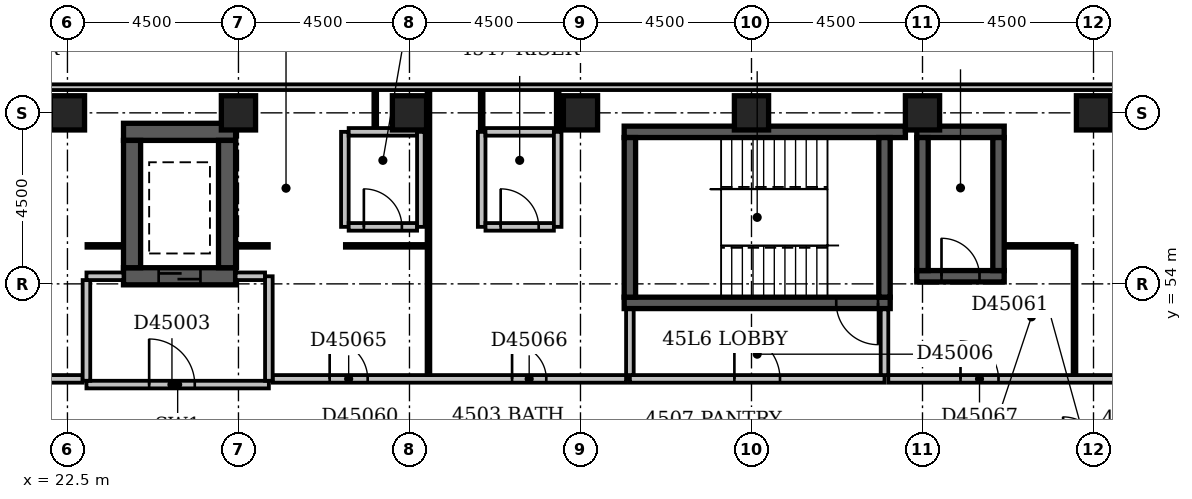
"""IFC4 building model, lengths in metres.
Left out: names, types, materials, properties, quantities, classifications, styles, units other than length and angle.
Written with IfcOpenShell. Run it as: python <this file> out.ifc"""

import sys

from ifc_helpers import new_model, si_unit, direction, frame, frame_2d, origin, origin_2d, place, context, subcontext, project, spatial, rectangle, extrude, element, fill, save


model = new_model("IFC4")
c1 = context("Model", 3, precision=1e-05, world=origin(), true_north=direction((0.0, 1.0)))
c2 = subcontext(c1, "Body", "Model", "MODEL_VIEW")
j1 = project(units=[si_unit("LENGTHUNIT", "METRE"), si_unit("PLANEANGLEUNIT", "RADIAN")], contexts=[c1])
p1 = place(None, origin())
s1 = spatial("IfcSite", under=j1, at=p1, CompositionType="ELEMENT")
p2 = place(p1, origin())
s2 = spatial("IfcBuilding", under=s1, at=p2, CompositionType="ELEMENT")
p3 = place(p2, frame((0.0, 0.0, 179.0)))
s3 = spatial("IfcBuildingStorey", under=s2, at=p3, CompositionType="ELEMENT", Elevation=179.0)
p4 = place(p3, frame((23.975, 54.2, -0.3), z_axis=(0.0, 0.0, 1.0), x_axis=(1.0, 0.0, 0.0)))
e1 = element("IfcWall", 1, at=p4, inside=s3, PredefinedType="SHEAR", context=c2, shape_type="SweptSolid", body=[
    extrude(rectangle(XDim=2.95, YDim=0.45, at=frame_2d((1.475, 0.0))), origin(), (0.0, 0.0, 1.0), 3.6),
])
p5 = place(p4, frame((0.925, 0.0, 0.3)))
e2 = element("IfcOpeningElement", 2, at=p5, cuts=e1, PredefinedType="OPENING", context=c2, shape_type="SweptSolid", body=[
    extrude(rectangle(XDim=1.1, YDim=2.1, at=frame_2d((0.55, 1.05))), frame((0.0, 0.237, 0.0), z_axis=(0.0, -1.0, 0.0), x_axis=(1.0, 0.0, 0.0)), (0.0, 0.0, 1.0), 0.474),
])
p6 = place(p3, frame((23.975, 58.0, -0.3), z_axis=(0.0, 0.0, 1.0), x_axis=(1.0, 0.0, 0.0)))
e3 = element("IfcWall", 3, at=p6, inside=s3, PredefinedType="SHEAR", context=c2, shape_type="SweptSolid", body=[
    extrude(rectangle(XDim=2.95, YDim=0.45, at=frame_2d((1.475, 0.0))), origin(), (0.0, 0.0, 1.0), 3.6),
])
for number, where, z_axis, x_axis in (
    (4, (24.2, 54.425, -0.3), (0.0, 0.0, 1.0), (0.0, 1.0, 0.0)),
    (5, (26.7, 54.425, -0.3), (0.0, 0.0, 1.0), (0.0, 1.0, 0.0)),
):
    element("IfcWall", number, at=place(p3, frame(where, z_axis=z_axis, x_axis=x_axis)), inside=s3, PredefinedType="SHEAR", context=c2, shape_type="SweptSolid", body=[
        extrude(rectangle(XDim=3.35, YDim=0.45, at=frame_2d((1.675, 0.0))), origin(), (0.0, 0.0, 1.0), 3.6),
    ])
p7 = place(p3, frame((37.15, 53.5, -0.3), z_axis=(0.0, 0.0, 1.0), x_axis=(1.0, 0.0, 0.0)))
e6 = element("IfcWall", 6, at=p7, inside=s3, PredefinedType="SHEAR", context=c2, shape_type="SweptSolid", body=[
    extrude(rectangle(XDim=7.0, YDim=0.3, at=frame_2d((3.5, 0.0))), origin(), (0.0, 0.0, 1.0), 3.6),
])
p8 = place(p7, frame((5.58, 0.0, 0.3)))
e7 = element("IfcOpeningElement", 7, at=p8, cuts=e6, PredefinedType="OPENING", context=c2, shape_type="SweptSolid", body=[
    extrude(rectangle(XDim=1.1, YDim=2.1, at=frame_2d((0.55, 1.05))), frame((0.0, 0.162, 0.0), z_axis=(0.0, -1.0, 0.0), x_axis=(1.0, 0.0, 0.0)), (0.0, 0.0, 1.0), 0.324),
])
p9 = place(p3, frame((37.15, 58.0, -0.3), z_axis=(0.0, 0.0, 1.0), x_axis=(1.0, 0.0, 0.0)))
e8 = element("IfcWall", 8, at=p9, inside=s3, PredefinedType="SHEAR", context=c2, shape_type="SweptSolid", body=[
    extrude(rectangle(XDim=7.4, YDim=0.3, at=frame_2d((3.7, 0.0))), origin(), (0.0, 0.0, 1.0), 3.6),
])
for number, where, z_axis, x_axis in (
    (9, (37.3, 53.65, -0.3), (0.0, 0.0, 1.0), (0.0, 1.0, 0.0)),
    (10, (44.0, 53.65, -0.3), (0.0, 0.0, 1.0), (0.0, 1.0, 0.0)),
):
    element("IfcWall", number, at=place(p3, frame(where, z_axis=z_axis, x_axis=x_axis)), inside=s3, PredefinedType="SHEAR", context=c2, shape_type="SweptSolid", body=[
        extrude(rectangle(XDim=4.2, YDim=0.3, at=frame_2d((2.1, 0.0))), origin(), (0.0, 0.0, 1.0), 3.6),
    ])
p10 = place(p3, frame((44.85, 54.2, -0.3), z_axis=(0.0, 0.0, 1.0), x_axis=(1.0, 0.0, 0.0)))
e11 = element("IfcWall", 11, at=p10, inside=s3, PredefinedType="SHEAR", context=c2, shape_type="SweptSolid", body=[
    extrude(rectangle(XDim=2.3, YDim=0.3, at=frame_2d((1.15, 0.0))), origin(), (0.0, 0.0, 1.0), 3.6),
])
p11 = place(p10, frame((0.65, 0.0, 0.3)))
e12 = element("IfcOpeningElement", 12, at=p11, cuts=e11, PredefinedType="OPENING", context=c2, shape_type="SweptSolid", body=[
    extrude(rectangle(XDim=1.0, YDim=2.1, at=frame_2d((0.5, 1.05))), frame((0.0, 0.162, 0.0), z_axis=(0.0, -1.0, 0.0), x_axis=(1.0, 0.0, 0.0)), (0.0, 0.0, 1.0), 0.324),
])
p12 = place(p3, frame((44.85, 58.0, -0.3), z_axis=(0.0, 0.0, 1.0), x_axis=(1.0, 0.0, 0.0)))
e13 = element("IfcWall", 13, at=p12, inside=s3, PredefinedType="SHEAR", context=c2, shape_type="SweptSolid", body=[
    extrude(rectangle(XDim=2.3, YDim=0.3, at=frame_2d((1.15, 0.0))), origin(), (0.0, 0.0, 1.0), 3.6),
])
for number, where, z_axis, x_axis in (
    (14, (45.0, 54.35, -0.3), (0.0, 0.0, 1.0), (0.0, 1.0, 0.0)),
    (15, (47.0, 54.35, -0.3), (0.0, 0.0, 1.0), (0.0, 1.0, 0.0)),
):
    element("IfcWall", number, at=place(p3, frame(where, z_axis=z_axis, x_axis=x_axis)), inside=s3, PredefinedType="SHEAR", context=c2, shape_type="SweptSolid", body=[
        extrude(rectangle(XDim=3.5, YDim=0.3, at=frame_2d((1.75, 0.0))), origin(), (0.0, 0.0, 1.0), 3.6),
    ])
for number, where, z_axis, x_axis in (
    (16, (22.5, 58.5, -0.3), (0.0, 0.0, 1.0), (1.0, 0.0, 0.0)),
    (17, (27.0, 58.5, -0.3), (0.0, 0.0, 1.0), (1.0, 0.0, 0.0)),
    (18, (31.5, 58.5, -0.3), (0.0, 0.0, 1.0), (1.0, 0.0, 0.0)),
    (19, (36.0, 58.5, -0.3), (0.0, 0.0, 1.0), (1.0, 0.0, 0.0)),
    (20, (40.5, 58.5, -0.3), (0.0, 0.0, 1.0), (1.0, 0.0, 0.0)),
    (21, (45.0, 58.5, -0.3), (0.0, 0.0, 1.0), (1.0, 0.0, 0.0)),
    (22, (49.5, 58.5, -0.3), (0.0, 0.0, 1.0), (1.0, 0.0, 0.0)),
):
    element("IfcColumn", number, at=place(p3, frame(where, z_axis=z_axis, x_axis=x_axis)), inside=s3, PredefinedType="COLUMN", context=c2, shape_type="SweptSolid", body=[
        extrude(rectangle(XDim=0.9, YDim=0.9, at=origin_2d()), origin(), (0.0, 0.0, 1.0), 3.6),
    ])
p13 = place(p3, frame((68.1, 59.175, 0.0), z_axis=(0.0, 0.0, 1.0), x_axis=(-1.0, 0.0, 0.0)))
e23 = element("IfcWall", 23, at=p13, inside=s3, PredefinedType="STANDARD", context=c2, shape_type="SweptSolid", body=[
    extrude(rectangle(XDim=68.85, YDim=0.15, at=frame_2d((34.425, 0.0))), origin(), (0.0, 0.0, 1.0), 2.7),
])
p14 = place(p3, frame((23.0, 51.35, 0.0), z_axis=(0.0, 0.0, 1.0), x_axis=(1.0, 0.0, 0.0)))
e24 = element("IfcWall", 24, at=p14, inside=s3, PredefinedType="PARTITIONING", context=c2, shape_type="SweptSolid", body=[
    extrude(rectangle(XDim=4.8, YDim=0.2, at=frame_2d((2.4, 0.0))), origin(), (0.0, 0.0, 1.0), 3.3),
])
p15 = place(p14, frame((1.65, 0.0, 0.0)))
e25 = element("IfcOpeningElement", 25, at=p15, cuts=e24, PredefinedType="OPENING", context=c2, shape_type="SweptSolid", body=[
    extrude(rectangle(XDim=1.2, YDim=2.1, at=frame_2d((0.6, 1.05))), frame((0.0, 0.112, 0.0), z_axis=(0.0, -1.0, 0.0), x_axis=(1.0, 0.0, 0.0)), (0.0, 0.0, 1.0), 0.224),
])
p16 = place(p3, frame((27.8, 51.45, 0.0), z_axis=(0.0, 0.0, 1.0), x_axis=(0.0, 1.0, 0.0)))
e26 = element("IfcWall", 26, at=p16, inside=s3, PredefinedType="PARTITIONING", context=c2, shape_type="SweptSolid", body=[
    extrude(rectangle(XDim=2.75, YDim=0.2, at=frame_2d((1.375, 0.0))), origin(), (0.0, 0.0, 1.0), 3.3),
])
p17 = place(p3, frame((23.0, 54.2, 0.0), z_axis=(0.0, 0.0, 1.0), x_axis=(1.0, 0.0, 0.0)))
e27 = element("IfcWall", 27, at=p17, inside=s3, PredefinedType="PARTITIONING", context=c2, shape_type="SweptSolid", body=[
    extrude(rectangle(XDim=0.975, YDim=0.2, at=frame_2d((0.488, 0.0))), origin(), (0.0, 0.0, 1.0), 3.3),
])
p18 = place(p3, frame((26.925, 54.2, 0.0), z_axis=(0.0, 0.0, 1.0), x_axis=(1.0, 0.0, 0.0)))
e28 = element("IfcWall", 28, at=p18, inside=s3, PredefinedType="PARTITIONING", context=c2, shape_type="SweptSolid", body=[
    extrude(rectangle(XDim=0.775, YDim=0.2, at=frame_2d((0.387, 0.0))), origin(), (0.0, 0.0, 1.0), 3.3),
])
p19 = place(p3, frame((23.0, 51.45, 0.0), z_axis=(0.0, 0.0, 1.0), x_axis=(0.0, 1.0, 0.0)))
e29 = element("IfcWall", 29, at=p19, inside=s3, PredefinedType="PARTITIONING", context=c2, shape_type="SweptSolid", body=[
    extrude(rectangle(XDim=2.65, YDim=0.2, at=frame_2d((1.325, 0.0))), origin(), (0.0, 0.0, 1.0), 3.3),
])
p20 = place(p3, frame((37.3, 51.5, 0.0), z_axis=(0.0, 0.0, 1.0), x_axis=(1.0, 0.0, 0.0)))
e30 = element("IfcWall", 30, at=p20, inside=s3, PredefinedType="PARTITIONING", context=c2, shape_type="SweptSolid", body=[
    extrude(rectangle(XDim=6.7, YDim=0.2, at=frame_2d((3.35, 0.0))), origin(), (0.0, 0.0, 1.0), 3.3),
])
p21 = place(p20, frame((2.75, 0.0, 0.0)))
e31 = element("IfcOpeningElement", 31, at=p21, cuts=e30, PredefinedType="OPENING", context=c2, shape_type="SweptSolid", body=[
    extrude(rectangle(XDim=1.2, YDim=2.1, at=frame_2d((0.6, 1.05))), frame((0.0, 0.112, 0.0), z_axis=(0.0, -1.0, 0.0), x_axis=(1.0, 0.0, 0.0)), (0.0, 0.0, 1.0), 0.224),
])
for number, where, z_axis, x_axis in (
    (32, (44.0, 51.6, 0.0), (0.0, 0.0, 1.0), (0.0, 1.0, 0.0)),
    (33, (37.3, 51.6, 0.0), (0.0, 0.0, 1.0), (0.0, 1.0, 0.0)),
):
    element("IfcWall", number, at=place(p3, frame(where, z_axis=z_axis, x_axis=x_axis)), inside=s3, PredefinedType="PARTITIONING", context=c2, shape_type="SweptSolid", body=[
        extrude(rectangle(XDim=1.73, YDim=0.2, at=frame_2d((0.865, 0.0))), origin(), (0.0, 0.0, 1.0), 3.3),
    ])
p22 = place(p3, frame((7.6, 51.5, 0.0), z_axis=(0.0, 0.0, 1.0), x_axis=(1.0, 0.0, 0.0)))
e34 = element("IfcWall", 34, at=p22, inside=s3, PredefinedType="PARTITIONING", context=c2, shape_type="SweptSolid", body=[
    extrude(rectangle(XDim=15.3, YDim=0.2, at=frame_2d((7.65, 0.0))), origin(), (0.0, 0.0, 1.0), 3.3),
])
p23 = place(p22, frame((3.55, 0.0, 0.0)))
e35 = element("IfcOpeningElement", 35, at=p23, cuts=e34, PredefinedType="OPENING", context=c2, shape_type="SweptSolid", body=[
    extrude(rectangle(XDim=0.9, YDim=2.1, at=frame_2d((0.45, 1.05))), frame((0.0, 0.112, 0.0), z_axis=(0.0, -1.0, 0.0), x_axis=(1.0, 0.0, 0.0)), (0.0, 0.0, 1.0), 0.224),
])
p24 = place(p22, frame((11.3, 0.0, 0.0)))
e36 = element("IfcOpeningElement", 36, at=p24, cuts=e34, PredefinedType="OPENING", context=c2, shape_type="SweptSolid", body=[
    extrude(rectangle(XDim=0.9, YDim=2.1, at=frame_2d((0.45, 1.05))), frame((0.0, 0.112, 0.0), z_axis=(0.0, -1.0, 0.0), x_axis=(1.0, 0.0, 0.0)), (0.0, 0.0, 1.0), 0.224),
])
p25 = place(p3, frame((27.9, 51.5, 0.0), z_axis=(0.0, 0.0, 1.0), x_axis=(1.0, 0.0, 0.0)))
e37 = element("IfcWall", 37, at=p25, inside=s3, PredefinedType="PARTITIONING", context=c2, shape_type="SweptSolid", body=[
    extrude(rectangle(XDim=9.3, YDim=0.2, at=frame_2d((4.65, 0.0))), origin(), (0.0, 0.0, 1.0), 3.3),
])
p26 = place(p25, frame((1.5, 0.0, 0.0)))
e38 = element("IfcOpeningElement", 38, at=p26, cuts=e37, PredefinedType="OPENING", context=c2, shape_type="SweptSolid", body=[
    extrude(rectangle(XDim=1.0, YDim=2.1, at=frame_2d((0.5, 1.05))), frame((0.0, 0.112, 0.0), z_axis=(0.0, -1.0, 0.0), x_axis=(1.0, 0.0, 0.0)), (0.0, 0.0, 1.0), 0.224),
])
p27 = place(p25, frame((6.3, 0.0, 0.0)))
e39 = element("IfcOpeningElement", 39, at=p27, cuts=e37, PredefinedType="OPENING", context=c2, shape_type="SweptSolid", body=[
    extrude(rectangle(XDim=0.9, YDim=2.1, at=frame_2d((0.45, 1.05))), frame((0.0, 0.112, 0.0), z_axis=(0.0, -1.0, 0.0), x_axis=(1.0, 0.0, 0.0)), (0.0, 0.0, 1.0), 0.224),
])
p28 = place(p3, frame((44.1, 51.5, 0.0), z_axis=(0.0, 0.0, 1.0), x_axis=(1.0, 0.0, 0.0)))
e40 = element("IfcWall", 40, at=p28, inside=s3, PredefinedType="PARTITIONING", context=c2, shape_type="SweptSolid", body=[
    extrude(rectangle(XDim=9.8, YDim=0.2, at=frame_2d((4.9, 0.0))), origin(), (0.0, 0.0, 1.0), 3.3),
])
p29 = place(p28, frame((1.9, 0.0, 0.0)))
e41 = element("IfcOpeningElement", 41, at=p29, cuts=e40, PredefinedType="OPENING", context=c2, shape_type="SweptSolid", body=[
    extrude(rectangle(XDim=1.0, YDim=2.1, at=frame_2d((0.5, 1.05))), frame((0.0, 0.112, 0.0), z_axis=(0.0, -1.0, 0.0), x_axis=(1.0, 0.0, 0.0)), (0.0, 0.0, 1.0), 0.224),
])
p30 = place(p28, frame((6.9, 0.0, 0.0)))
e42 = element("IfcOpeningElement", 42, at=p30, cuts=e40, PredefinedType="OPENING", context=c2, shape_type="SweptSolid", body=[
    extrude(rectangle(XDim=1.0, YDim=2.1, at=frame_2d((0.5, 1.05))), frame((0.0, 0.112, 0.0), z_axis=(0.0, -1.0, 0.0), x_axis=(1.0, 0.0, 0.0)), (0.0, 0.0, 1.0), 0.224),
])
p31 = place(p3, frame((32.0, 51.6, 0.0), z_axis=(0.0, 0.0, 1.0), x_axis=(0.0, 1.0, 0.0)))
e43 = element("IfcWall", 43, at=p31, inside=s3, PredefinedType="PARTITIONING", context=c2, shape_type="SweptSolid", body=[
    extrude(rectangle(XDim=7.5, YDim=0.1, at=frame_2d((3.75, 0.0))), origin(), (0.0, 0.0, 1.0), 3.3),
])
p32 = place(p3, frame((49.0, 51.6, 0.0), z_axis=(0.0, 0.0, 1.0), x_axis=(0.0, 1.0, 0.0)))
e44 = element("IfcWall", 44, at=p32, inside=s3, PredefinedType="PARTITIONING", context=c2, shape_type="SweptSolid", body=[
    extrude(rectangle(XDim=3.4, YDim=0.1, at=frame_2d((1.7, 0.0))), origin(), (0.0, 0.0, 1.0), 3.3),
])
p33 = place(p3, frame((23.0, 55.0, 0.0), z_axis=(0.0, 0.0, 1.0), x_axis=(1.0, 0.0, 0.0)))
e45 = element("IfcWall", 45, at=p33, inside=s3, PredefinedType="PARTITIONING", context=c2, shape_type="SweptSolid", body=[
    extrude(rectangle(XDim=0.975, YDim=0.1, at=frame_2d((0.488, 0.0))), origin(), (0.0, 0.0, 1.0), 3.3),
])
p34 = place(p3, frame((26.925, 55.0, 0.0), z_axis=(0.0, 0.0, 1.0), x_axis=(1.0, 0.0, 0.0)))
e46 = element("IfcWall", 46, at=p34, inside=s3, PredefinedType="PARTITIONING", context=c2, shape_type="SweptSolid", body=[
    extrude(rectangle(XDim=0.875, YDim=0.1, at=frame_2d((0.438, 0.0))), origin(), (0.0, 0.0, 1.0), 3.3),
])
p35 = place(p3, frame((29.8, 55.0, 0.0), z_axis=(0.0, 0.0, 1.0), x_axis=(1.0, 0.0, 0.0)))
e47 = element("IfcWall", 47, at=p35, inside=s3, PredefinedType="PARTITIONING", context=c2, shape_type="SweptSolid", body=[
    extrude(rectangle(XDim=2.15, YDim=0.1, at=frame_2d((1.075, 0.0))), origin(), (0.0, 0.0, 1.0), 3.3),
])
p36 = place(p3, frame((47.15, 55.0, 0.0), z_axis=(0.0, 0.0, 1.0), x_axis=(1.0, 0.0, 0.0)))
e48 = element("IfcWall", 48, at=p36, inside=s3, PredefinedType="PARTITIONING", context=c2, shape_type="SweptSolid", body=[
    extrude(rectangle(XDim=1.8, YDim=0.1, at=frame_2d((0.9, 0.0))), origin(), (0.0, 0.0, 1.0), 3.3),
])
p37 = place(p3, frame((29.8, 55.5, 0.0), z_axis=(0.0, 0.0, 1.0), x_axis=(0.0, 1.0, 0.0)))
e49 = element("IfcWall", 49, at=p37, inside=s3, PredefinedType="PARTITIONING", context=c2, shape_type="SweptSolid", body=[
    extrude(rectangle(XDim=2.5, YDim=0.2, at=frame_2d((1.25, 0.0))), origin(), (0.0, 0.0, 1.0), 3.3),
])
p38 = place(p3, frame((29.9, 55.5, 0.0), z_axis=(0.0, 0.0, 1.0), x_axis=(1.0, 0.0, 0.0)))
e50 = element("IfcWall", 50, at=p38, inside=s3, PredefinedType="PARTITIONING", context=c2, shape_type="SweptSolid", body=[
    extrude(rectangle(XDim=1.8, YDim=0.2, at=frame_2d((0.9, 0.0))), origin(), (0.0, 0.0, 1.0), 3.3),
])
p39 = place(p38, frame((0.4, 0.0, 0.0)))
e51 = element("IfcOpeningElement", 51, at=p39, cuts=e50, PredefinedType="OPENING", context=c2, shape_type="SweptSolid", body=[
    extrude(rectangle(XDim=1.0, YDim=2.1, at=frame_2d((0.5, 1.05))), frame((0.0, 0.112, 0.0), z_axis=(0.0, -1.0, 0.0), x_axis=(1.0, 0.0, 0.0)), (0.0, 0.0, 1.0), 0.224),
])
for number, where, z_axis, x_axis in (
    (52, (31.8, 55.5, 0.0), (0.0, 0.0, 1.0), (0.0, 1.0, 0.0)),
    (53, (33.4, 55.5, 0.0), (0.0, 0.0, 1.0), (0.0, 1.0, 0.0)),
):
    element("IfcWall", number, at=place(p3, frame(where, z_axis=z_axis, x_axis=x_axis)), inside=s3, PredefinedType="PARTITIONING", context=c2, shape_type="SweptSolid", body=[
        extrude(rectangle(XDim=2.5, YDim=0.2, at=frame_2d((1.25, 0.0))), origin(), (0.0, 0.0, 1.0), 3.3),
    ])
p40 = place(p3, frame((33.5, 55.5, 0.0), z_axis=(0.0, 0.0, 1.0), x_axis=(1.0, 0.0, 0.0)))
e54 = element("IfcWall", 54, at=p40, inside=s3, PredefinedType="PARTITIONING", context=c2, shape_type="SweptSolid", body=[
    extrude(rectangle(XDim=1.8, YDim=0.2, at=frame_2d((0.9, 0.0))), origin(), (0.0, 0.0, 1.0), 3.3),
])
p41 = place(p40, frame((0.4, 0.0, 0.0)))
e55 = element("IfcOpeningElement", 55, at=p41, cuts=e54, PredefinedType="OPENING", context=c2, shape_type="SweptSolid", body=[
    extrude(rectangle(XDim=1.0, YDim=2.1, at=frame_2d((0.5, 1.05))), frame((0.0, 0.112, 0.0), z_axis=(0.0, -1.0, 0.0), x_axis=(1.0, 0.0, 0.0)), (0.0, 0.0, 1.0), 0.224),
])
p42 = place(p3, frame((35.4, 55.5, 0.0), z_axis=(0.0, 0.0, 1.0), x_axis=(0.0, 1.0, 0.0)))
e56 = element("IfcWall", 56, at=p42, inside=s3, PredefinedType="PARTITIONING", context=c2, shape_type="SweptSolid", body=[
    extrude(rectangle(XDim=2.5, YDim=0.2, at=frame_2d((1.25, 0.0))), origin(), (0.0, 0.0, 1.0), 2.4),
])
p43 = place(p3, frame((29.9, 58.0, 0.0), z_axis=(0.0, 0.0, 1.0), x_axis=(1.0, 0.0, 0.0)))
e57 = element("IfcWall", 57, at=p43, inside=s3, PredefinedType="PARTITIONING", context=c2, shape_type="SweptSolid", body=[
    extrude(rectangle(XDim=1.8, YDim=0.2, at=frame_2d((0.9, 0.0))), origin(), (0.0, 0.0, 1.0), 3.3),
])
p44 = place(p3, frame((33.4, 58.0, 0.0), z_axis=(0.0, 0.0, 1.0), x_axis=(0.0, 1.0, 0.0)))
e58 = element("IfcWall", 58, at=p44, inside=s3, PredefinedType="PARTITIONING", context=c2, shape_type="SweptSolid", body=[
    extrude(rectangle(XDim=1.1, YDim=0.1, at=frame_2d((0.55, 0.0))), origin(), (0.0, 0.0, 1.0), 3.3),
])
p45 = place(p3, frame((33.5, 58.0, 0.0), z_axis=(0.0, 0.0, 1.0), x_axis=(1.0, 0.0, 0.0)))
e59 = element("IfcWall", 59, at=p45, inside=s3, PredefinedType="PARTITIONING", context=c2, shape_type="SweptSolid", body=[
    extrude(rectangle(XDim=1.8, YDim=0.2, at=frame_2d((0.9, 0.0))), origin(), (0.0, 0.0, 1.0), 3.3),
])
p46 = place(p3, frame((35.4, 58.0, 0.0), z_axis=(0.0, 0.0, 1.0), x_axis=(0.0, 1.0, 0.0)))
e60 = element("IfcWall", 60, at=p46, inside=s3, PredefinedType="PARTITIONING", context=c2, shape_type="SweptSolid", body=[
    extrude(rectangle(XDim=1.1, YDim=0.1, at=frame_2d((0.55, 0.0))), origin(), (0.0, 0.0, 1.0), 2.4),
])
p47 = place(p3, frame((30.6, 58.1, 0.0), z_axis=(0.0, 0.0, 1.0), x_axis=(0.0, 1.0, 0.0)))
e61 = element("IfcWall", 61, at=p47, inside=s3, PredefinedType="PARTITIONING", context=c2, shape_type="SweptSolid", body=[
    extrude(rectangle(XDim=1.0, YDim=0.1, at=frame_2d((0.5, 0.0))), origin(), (0.0, 0.0, 1.0), 3.3),
])
p48 = place(p15, origin())
e62 = element("IfcDoor", 62, at=p48, inside=s3, OperationType="SINGLE_SWING_LEFT", PredefinedType="DOOR", context=c2, shape_type="SweptSolid", body=[
    extrude(rectangle(XDim=1.2, YDim=2.1, at=frame_2d((0.6, 1.05))), frame((0.0, 0.025, 0.0), z_axis=(0.0, -1.0, 0.0), x_axis=(1.0, 0.0, 0.0)), (0.0, 0.0, 1.0), 0.05),
])
fill(e25, e62)
p49 = place(p5, origin())
e63 = element("IfcDoor", 63, at=p49, inside=s3, OperationType="SLIDING_TO_LEFT", PredefinedType="DOOR", context=c2, shape_type="SweptSolid", body=[
    extrude(rectangle(XDim=1.1, YDim=2.1, at=frame_2d((0.55, 1.05))), frame((0.0, 0.025, 0.0), z_axis=(0.0, -1.0, 0.0), x_axis=(1.0, 0.0, 0.0)), (0.0, 0.0, 1.0), 0.05),
])
fill(e2, e63)
p50 = place(p21, origin())
e64 = element("IfcDoor", 64, at=p50, inside=s3, OperationType="SINGLE_SWING_LEFT", PredefinedType="DOOR", context=c2, shape_type="SweptSolid", body=[
    extrude(rectangle(XDim=1.2, YDim=2.1, at=frame_2d((0.6, 1.05))), frame((0.0, 0.025, 0.0), z_axis=(0.0, -1.0, 0.0), x_axis=(1.0, 0.0, 0.0)), (0.0, 0.0, 1.0), 0.05),
])
fill(e31, e64)
p51 = place(p11, origin())
e65 = element("IfcDoor", 65, at=p51, inside=s3, OperationType="SINGLE_SWING_LEFT", PredefinedType="DOOR", context=c2, shape_type="SweptSolid", body=[
    extrude(rectangle(XDim=1.0, YDim=2.1, at=frame_2d((0.5, 1.05))), frame((0.0, 0.025, 0.0), z_axis=(0.0, -1.0, 0.0), x_axis=(1.0, 0.0, 0.0)), (0.0, 0.0, 1.0), 0.05),
])
fill(e12, e65)
p52 = place(p8, origin())
e66 = element("IfcDoor", 66, at=p52, inside=s3, OperationType="SINGLE_SWING_RIGHT", PredefinedType="DOOR", context=c2, shape_type="SweptSolid", body=[
    extrude(rectangle(XDim=1.1, YDim=2.1, at=frame_2d((0.55, 1.05))), frame((0.0, 0.025, 0.0), z_axis=(0.0, -1.0, 0.0), x_axis=(1.0, 0.0, 0.0)), (0.0, 0.0, 1.0), 0.05),
])
fill(e7, e66)
p53 = place(p26, origin())
e67 = element("IfcDoor", 67, at=p53, inside=s3, OperationType="SINGLE_SWING_LEFT", PredefinedType="DOOR", context=c2, shape_type="SweptSolid", body=[
    extrude(rectangle(XDim=1.0, YDim=2.1, at=frame_2d((0.5, 1.05))), frame((0.0, 0.025, 0.0), z_axis=(0.0, -1.0, 0.0), x_axis=(1.0, 0.0, 0.0)), (0.0, 0.0, 1.0), 0.05),
])
fill(e38, e67)
p54 = place(p27, origin())
e68 = element("IfcDoor", 68, at=p54, inside=s3, OperationType="SINGLE_SWING_LEFT", PredefinedType="DOOR", context=c2, shape_type="SweptSolid", body=[
    extrude(rectangle(XDim=0.9, YDim=2.1, at=frame_2d((0.45, 1.05))), frame((0.0, 0.025, 0.0), z_axis=(0.0, -1.0, 0.0), x_axis=(1.0, 0.0, 0.0)), (0.0, 0.0, 1.0), 0.05),
])
fill(e39, e68)
p55 = place(p29, origin())
e69 = element("IfcDoor", 69, at=p55, inside=s3, OperationType="SINGLE_SWING_LEFT", PredefinedType="DOOR", context=c2, shape_type="SweptSolid", body=[
    extrude(rectangle(XDim=1.0, YDim=2.1, at=frame_2d((0.5, 1.05))), frame((0.0, 0.025, 0.0), z_axis=(0.0, -1.0, 0.0), x_axis=(1.0, 0.0, 0.0)), (0.0, 0.0, 1.0), 0.05),
])
fill(e41, e69)
p56 = place(p39, origin())
e70 = element("IfcDoor", 70, at=p56, inside=s3, OperationType="SINGLE_SWING_LEFT", PredefinedType="DOOR", context=c2, shape_type="SweptSolid", body=[
    extrude(rectangle(XDim=1.0, YDim=2.1, at=frame_2d((0.5, 1.05))), frame((0.0, 0.025, 0.0), z_axis=(0.0, -1.0, 0.0), x_axis=(1.0, 0.0, 0.0)), (0.0, 0.0, 1.0), 0.05),
])
fill(e51, e70)
p57 = place(p41, origin())
e71 = element("IfcDoor", 71, at=p57, inside=s3, OperationType="SINGLE_SWING_LEFT", PredefinedType="DOOR", context=c2, shape_type="SweptSolid", body=[
    extrude(rectangle(XDim=1.0, YDim=2.1, at=frame_2d((0.5, 1.05))), frame((0.0, 0.025, 0.0), z_axis=(0.0, -1.0, 0.0), x_axis=(1.0, 0.0, 0.0)), (0.0, 0.0, 1.0), 0.05),
])
fill(e55, e71)
save(model, sys.argv[1])
